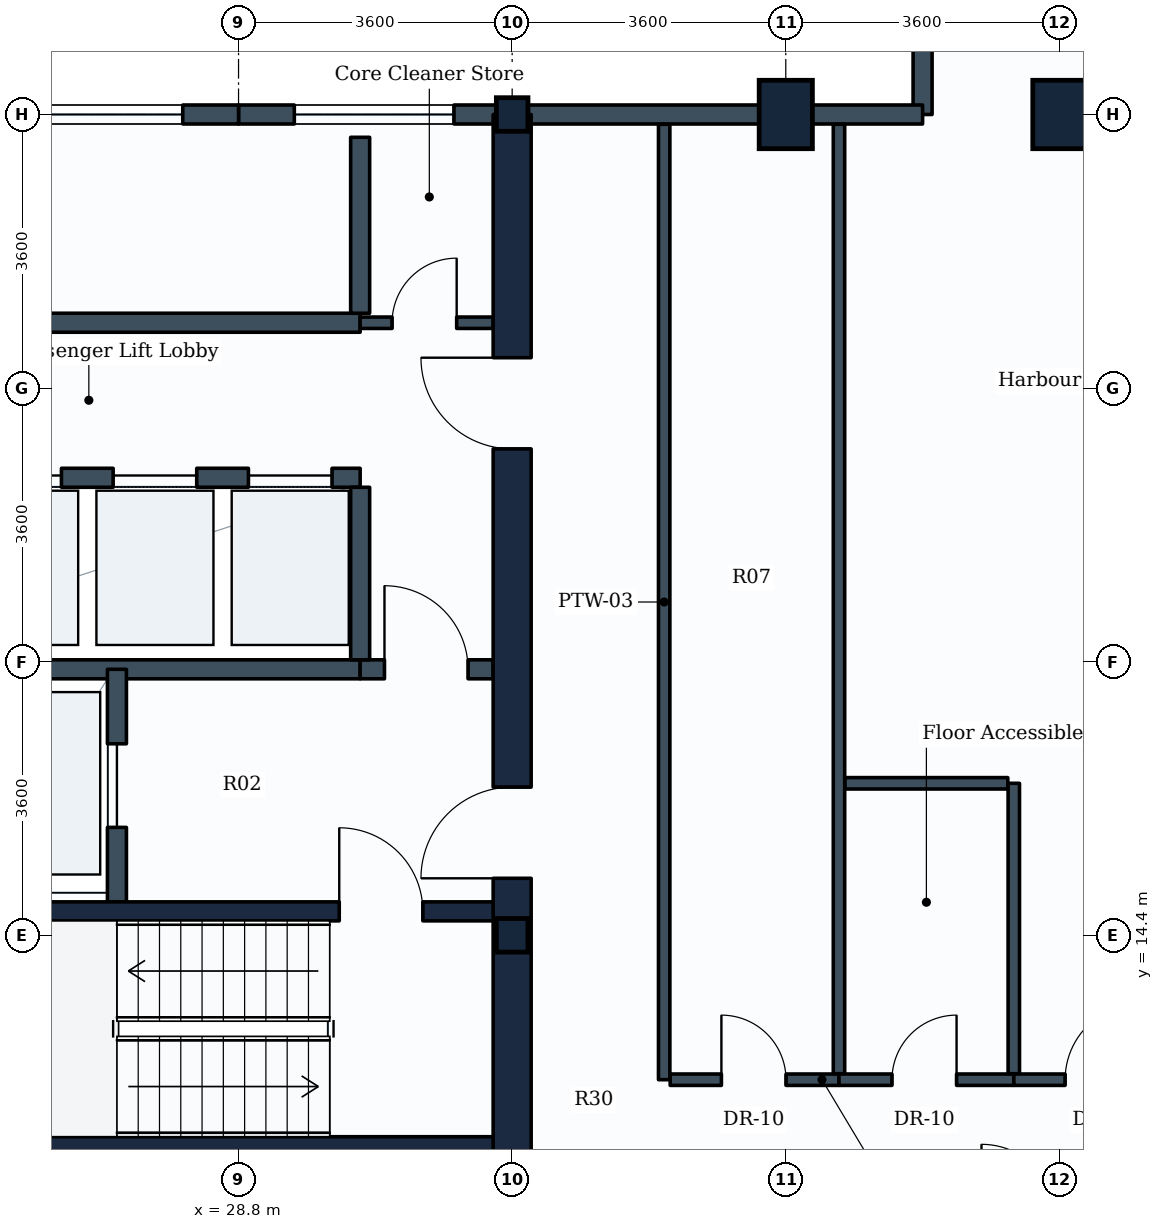
"""IFC4 building model, lengths in metres.
Left out: names, types, materials, properties, quantities, classifications, styles, units other than length and angle.
Written with IfcOpenShell. Run it as: python <this file> out.ifc"""

import sys

from ifc_helpers import new_model, si_unit, direction, frame, frame_2d, origin, origin_2d, place, context, subcontext, project, spatial, rectangle, i_section, extrude, element, fill, save


model = new_model("IFC4")
c1 = context("Model", 3, precision=1e-05, world=origin(), true_north=direction((0.0, 1.0)))
c2 = subcontext(c1, "Body", "Model", "MODEL_VIEW")
j1 = project(units=[si_unit("LENGTHUNIT", "METRE"), si_unit("PLANEANGLEUNIT", "RADIAN")], contexts=[c1])
p1 = place(None, origin())
s1 = spatial("IfcSite", under=j1, at=p1, CompositionType="ELEMENT")
p2 = place(p1, origin())
s2 = spatial("IfcBuilding", under=s1, at=p2, CompositionType="ELEMENT")
p3 = place(p2, frame((0.0, 0.0, 178.6)))
s3 = spatial("IfcBuildingStorey", under=s2, at=p3, CompositionType="ELEMENT", Elevation=178.6)
for number, where, z_axis, x_axis in (
    (1, (32.4, 14.4, 0.0), (0.0, 0.0, 1.0), (1.0, 0.0, 0.0)),
    (2, (32.4, 25.2, 0.0), (0.0, 0.0, 1.0), (1.0, 0.0, 0.0)),
):
    element("IfcColumn", number, at=place(p3, frame(where, z_axis=z_axis, x_axis=x_axis)), inside=s3, PredefinedType="COLUMN", context=c2, shape_type="SweptSolid", body=[
        extrude(i_section(OverallWidth=0.416, OverallDepth=0.442, WebThickness=0.025, FlangeThickness=0.041, FilletRadius=0.015, at=origin_2d()), origin(), (0.0, 0.0, 1.0), 3.8),
    ])
for number, where, z_axis, x_axis in (
    (3, (36.0, 25.2, 0.0), (0.0, 0.0, 1.0), (1.0, 0.0, 0.0)),
    (4, (39.6, 25.2, 0.0), (0.0, 0.0, 1.0), (1.0, 0.0, 0.0)),
):
    element("IfcColumn", number, at=place(p3, frame(where, z_axis=z_axis, x_axis=x_axis)), inside=s3, PredefinedType="COLUMN", context=c2, shape_type="SweptSolid", body=[
        extrude(rectangle(XDim=0.7, YDim=0.9, at=origin_2d()), origin(), (0.0, 0.0, 1.0), 3.8),
    ])
p4 = place(p3, frame((37.8, 27.3, 0.0), z_axis=(0.0, 0.0, 1.0), x_axis=(0.0, -1.0, 0.0)))
e5 = element("IfcWall", 5, at=p4, inside=s3, PredefinedType="STANDARD", context=c2, shape_type="SweptSolid", body=[
    extrude(rectangle(XDim=2.1, YDim=0.25, at=frame_2d((1.05, 0.0))), origin(), (0.0, 0.0, 1.0), 2.93),
])
p5 = place(p3, frame((36.0, 25.2, 0.0), z_axis=(0.0, 0.0, 1.0), x_axis=(1.0, 0.0, 0.0)))
e6 = element("IfcWall", 6, at=p5, inside=s3, PredefinedType="STANDARD", context=c2, shape_type="SweptSolid", body=[
    extrude(rectangle(XDim=1.8, YDim=0.25, at=frame_2d((0.9, 0.0))), origin(), (0.0, 0.0, 1.0), 2.93),
])
p6 = place(p3, frame((32.4, 25.2, 0.0), z_axis=(0.0, 0.0, 1.0), x_axis=(1.0, 0.0, 0.0)))
e7 = element("IfcWall", 7, at=p6, inside=s3, PredefinedType="STANDARD", context=c2, shape_type="SweptSolid", body=[
    extrude(rectangle(XDim=3.6, YDim=0.25, at=frame_2d((1.8, 0.0))), origin(), (0.0, 0.0, 1.0), 2.93),
])
p7 = place(p3, frame((28.8, 25.2, 0.0), z_axis=(0.0, 0.0, 1.0), x_axis=(1.0, 0.0, 0.0)))
e8 = element("IfcWall", 8, at=p7, inside=s3, PredefinedType="STANDARD", context=c2, shape_type="SweptSolid", body=[
    extrude(rectangle(XDim=3.6, YDim=0.25, at=frame_2d((1.8, 0.0))), origin(), (0.0, 0.0, 1.0), 2.93),
])
p8 = place(p7, frame((0.734, 0.0, 0.85)))
e9 = element("IfcOpeningElement", 9, at=p8, cuts=e8, PredefinedType="OPENING", context=c2, shape_type="SweptSolid", body=[
    extrude(rectangle(XDim=2.1, YDim=1.35, at=frame_2d((1.05, 0.675))), frame((0.0, 0.135, 0.0), z_axis=(0.0, -1.0, 0.0), x_axis=(1.0, 0.0, 0.0)), (0.0, 0.0, 1.0), 0.27),
])
p9 = place(p3, frame((25.2, 25.2, 0.0), z_axis=(0.0, 0.0, 1.0), x_axis=(1.0, 0.0, 0.0)))
e10 = element("IfcWall", 10, at=p9, inside=s3, PredefinedType="STANDARD", context=c2, shape_type="SweptSolid", body=[
    extrude(rectangle(XDim=3.6, YDim=0.25, at=frame_2d((1.8, 0.0))), origin(), (0.0, 0.0, 1.0), 2.93),
])
p10 = place(p9, frame((0.766, 0.0, 0.85)))
e11 = element("IfcOpeningElement", 11, at=p10, cuts=e10, PredefinedType="OPENING", context=c2, shape_type="SweptSolid", body=[
    extrude(rectangle(XDim=2.1, YDim=1.35, at=frame_2d((1.05, 0.675))), frame((0.0, 0.135, 0.0), z_axis=(0.0, -1.0, 0.0), x_axis=(1.0, 0.0, 0.0)), (0.0, 0.0, 1.0), 0.27),
])
p11 = place(p3, frame((32.4, 10.8, 0.0), z_axis=(0.0, 0.0, 1.0), x_axis=(0.0, 1.0, 0.0)))
e12 = element("IfcWall", 12, at=p11, inside=s3, PredefinedType="SHEAR", context=c2, shape_type="SweptSolid", body=[
    extrude(rectangle(XDim=14.4, YDim=0.5, at=frame_2d((7.2, 0.0))), origin(), (0.0, 0.0, 1.0), 3.55),
])
p12 = place(p11, frame((4.35, 0.0, 0.0)))
e13 = element("IfcOpeningElement", 13, at=p12, cuts=e12, PredefinedType="OPENING", context=c2, shape_type="SweptSolid", body=[
    extrude(rectangle(XDim=1.2, YDim=2.1, at=frame_2d((0.6, 1.05))), frame((0.0, 0.26, 0.0), z_axis=(0.0, -1.0, 0.0), x_axis=(1.0, 0.0, 0.0)), (0.0, 0.0, 1.0), 0.52),
])
p13 = place(p11, frame((10.0, 0.0, 0.0)))
e14 = element("IfcOpeningElement", 14, at=p13, cuts=e12, PredefinedType="OPENING", context=c2, shape_type="SweptSolid", body=[
    extrude(rectangle(XDim=1.2, YDim=2.1, at=frame_2d((0.6, 1.05))), frame((0.0, 0.26, 0.0), z_axis=(0.0, -1.0, 0.0), x_axis=(1.0, 0.0, 0.0)), (0.0, 0.0, 1.0), 0.52),
])
p14 = place(p3, frame((23.35, 11.625, 0.0), z_axis=(0.0, 0.0, 1.0), x_axis=(1.0, 0.0, 0.0)))
e15 = element("IfcWall", 15, at=p14, inside=s3, PredefinedType="SHEAR", context=c2, shape_type="SweptSolid", body=[
    extrude(rectangle(XDim=8.8, YDim=0.25, at=frame_2d((4.4, 0.0))), origin(), (0.0, 0.0, 1.0), 3.55),
])
p15 = place(p3, frame((23.35, 14.715, 0.0), z_axis=(0.0, 0.0, 1.0), x_axis=(1.0, 0.0, 0.0)))
e16 = element("IfcWall", 16, at=p15, inside=s3, PredefinedType="SHEAR", context=c2, shape_type="SweptSolid", body=[
    extrude(rectangle(XDim=8.8, YDim=0.25, at=frame_2d((4.4, 0.0))), origin(), (0.0, 0.0, 1.0), 3.55),
])
p16 = place(p15, frame((6.775, 0.0, 0.0)))
e17 = element("IfcOpeningElement", 17, at=p16, cuts=e16, PredefinedType="OPENING", context=c2, shape_type="SweptSolid", body=[
    extrude(rectangle(XDim=1.1, YDim=2.1, at=frame_2d((0.55, 1.05))), frame((0.0, 0.135, 0.0), z_axis=(0.0, -1.0, 0.0), x_axis=(1.0, 0.0, 0.0)), (0.0, 0.0, 1.0), 0.27),
])
p17 = place(p3, frame((21.88, 17.9, 0.0), z_axis=(0.0, 0.0, 1.0), x_axis=(1.0, 0.0, 0.0)))
e18 = element("IfcWall", 18, at=p17, inside=s3, PredefinedType="PARTITIONING", context=c2, shape_type="SweptSolid", body=[
    extrude(rectangle(XDim=8.52, YDim=0.25, at=frame_2d((4.26, 0.0))), origin(), (0.0, 0.0, 1.0), 3.535),
])
p18 = place(p3, frame((30.4, 17.9, 0.0), z_axis=(0.0, 0.0, 1.0), x_axis=(1.0, 0.0, 0.0)))
e19 = element("IfcWall", 19, at=p18, inside=s3, PredefinedType="PARTITIONING", context=c2, shape_type="SweptSolid", body=[
    extrude(rectangle(XDim=1.75, YDim=0.25, at=frame_2d((0.875, 0.0))), origin(), (0.0, 0.0, 1.0), 3.535),
])
p19 = place(p18, frame((0.32, 0.0, 0.0)))
e20 = element("IfcOpeningElement", 20, at=p19, cuts=e19, PredefinedType="OPENING", context=c2, shape_type="SweptSolid", body=[
    extrude(rectangle(XDim=1.1, YDim=2.1, at=frame_2d((0.55, 1.05))), frame((0.0, 0.135, 0.0), z_axis=(0.0, -1.0, 0.0), x_axis=(1.0, 0.0, 0.0)), (0.0, 0.0, 1.0), 0.27),
])
p20 = place(p3, frame((27.2, 14.84, 0.0), z_axis=(0.0, 0.0, 1.0), x_axis=(0.0, 1.0, 0.0)))
e21 = element("IfcWall", 21, at=p20, inside=s3, PredefinedType="PARTITIONING", context=c2, shape_type="SweptSolid", body=[
    extrude(rectangle(XDim=3.06, YDim=0.25, at=frame_2d((1.53, 0.0))), origin(), (0.0, 0.0, 1.0), 3.535),
])
p21 = place(p20, frame((0.98, 0.0, 0.0)))
e22 = element("IfcOpeningElement", 22, at=p21, cuts=e21, PredefinedType="OPENING", context=c2, shape_type="SweptSolid", body=[
    extrude(rectangle(XDim=1.1, YDim=2.1, at=frame_2d((0.55, 1.05))), frame((0.0, 0.135, 0.0), z_axis=(0.0, -1.0, 0.0), x_axis=(1.0, 0.0, 0.0)), (0.0, 0.0, 1.0), 0.27),
])
p22 = place(p3, frame((23.18, 20.42, 0.0), z_axis=(0.0, 0.0, 1.0), x_axis=(1.0, 0.0, 0.0)))
e23 = element("IfcWall", 23, at=p22, inside=s3, PredefinedType="PARTITIONING", context=c2, shape_type="SweptSolid", body=[
    extrude(rectangle(XDim=7.22, YDim=0.25, at=frame_2d((3.61, 0.0))), origin(), (0.0, 0.0, 1.0), 3.535),
])
p23 = place(p22, frame((0.41, 0.0, 0.0)))
e24 = element("IfcOpeningElement", 24, at=p23, cuts=e23, PredefinedType="OPENING", context=c2, shape_type="SweptSolid", body=[
    extrude(rectangle(XDim=1.1, YDim=2.1, at=frame_2d((0.55, 1.05))), frame((0.0, 0.135, 0.0), z_axis=(0.0, -1.0, 0.0), x_axis=(1.0, 0.0, 0.0)), (0.0, 0.0, 1.0), 0.27),
])
p24 = place(p22, frame((2.19, 0.0, 0.0)))
e25 = element("IfcOpeningElement", 25, at=p24, cuts=e23, PredefinedType="OPENING", context=c2, shape_type="SweptSolid", body=[
    extrude(rectangle(XDim=1.1, YDim=2.1, at=frame_2d((0.55, 1.05))), frame((0.0, 0.135, 0.0), z_axis=(0.0, -1.0, 0.0), x_axis=(1.0, 0.0, 0.0)), (0.0, 0.0, 1.0), 0.27),
])
p25 = place(p22, frame((3.97, 0.0, 0.0)))
e26 = element("IfcOpeningElement", 26, at=p25, cuts=e23, PredefinedType="OPENING", context=c2, shape_type="SweptSolid", body=[
    extrude(rectangle(XDim=1.1, YDim=2.1, at=frame_2d((0.55, 1.05))), frame((0.0, 0.135, 0.0), z_axis=(0.0, -1.0, 0.0), x_axis=(1.0, 0.0, 0.0)), (0.0, 0.0, 1.0), 0.27),
])
p26 = place(p22, frame((5.75, 0.0, 0.0)))
e27 = element("IfcOpeningElement", 27, at=p26, cuts=e23, PredefinedType="OPENING", context=c2, shape_type="SweptSolid", body=[
    extrude(rectangle(XDim=1.1, YDim=2.1, at=frame_2d((0.55, 1.05))), frame((0.0, 0.135, 0.0), z_axis=(0.0, -1.0, 0.0), x_axis=(1.0, 0.0, 0.0)), (0.0, 0.0, 1.0), 0.27),
])
p27 = place(p3, frame((30.4, 18.025, 0.0), z_axis=(0.0, 0.0, 1.0), x_axis=(0.0, 1.0, 0.0)))
e28 = element("IfcWall", 28, at=p27, inside=s3, PredefinedType="PARTITIONING", context=c2, shape_type="SweptSolid", body=[
    extrude(rectangle(XDim=2.27, YDim=0.25, at=frame_2d((1.135, 0.0))), origin(), (0.0, 0.0, 1.0), 3.535),
])
p28 = place(p3, frame((23.18, 22.46, 0.0), z_axis=(0.0, 0.0, 1.0), x_axis=(1.0, 0.0, 0.0)))
e29 = element("IfcWall", 29, at=p28, inside=s3, PredefinedType="PARTITIONING", context=c2, shape_type="SweptSolid", body=[
    extrude(rectangle(XDim=7.22, YDim=0.25, at=frame_2d((3.61, 0.0))), origin(), (0.0, 0.0, 1.0), 3.535),
])
p29 = place(p3, frame((30.4, 22.585, 0.0), z_axis=(0.0, 0.0, 1.0), x_axis=(0.0, 1.0, 0.0)))
e30 = element("IfcWall", 30, at=p29, inside=s3, PredefinedType="PARTITIONING", context=c2, shape_type="SweptSolid", body=[
    extrude(rectangle(XDim=2.315, YDim=0.25, at=frame_2d((1.157, 0.0))), origin(), (0.0, 0.0, 1.0), 3.535),
])
p30 = place(p3, frame((30.4, 22.46, 0.0), z_axis=(0.0, 0.0, 1.0), x_axis=(1.0, 0.0, 0.0)))
e31 = element("IfcWall", 31, at=p30, inside=s3, PredefinedType="PARTITIONING", context=c2, shape_type="SweptSolid", body=[
    extrude(rectangle(XDim=1.75, YDim=0.15, at=frame_2d((0.875, 0.0))), origin(), (0.0, 0.0, 1.0), 3.535),
])
p31 = place(p30, frame((0.42, 0.0, 0.0)))
e32 = element("IfcOpeningElement", 32, at=p31, cuts=e31, PredefinedType="OPENING", context=c2, shape_type="SweptSolid", body=[
    extrude(rectangle(XDim=0.85, YDim=2.1, at=frame_2d((0.425, 1.05))), frame((0.0, 0.085, 0.0), z_axis=(0.0, -1.0, 0.0), x_axis=(1.0, 0.0, 0.0)), (0.0, 0.0, 1.0), 0.17),
])
p32 = place(p3, frame((34.4, 12.5, 0.0), z_axis=(0.0, 0.0, 1.0), x_axis=(0.0, 1.0, 0.0)))
e33 = element("IfcWall", 33, at=p32, inside=s3, PredefinedType="PARTITIONING", context=c2, shape_type="SweptSolid", body=[
    extrude(rectangle(XDim=12.571, YDim=0.15, at=frame_2d((6.286, 0.0))), origin(), (0.0, 0.0, 1.0), 2.93),
])
p33 = place(p3, frame((34.479, 12.5, 0.0), z_axis=(0.0, 0.0, 1.0), x_axis=(1.0, 0.0, 0.0)))
e34 = element("IfcWall", 34, at=p33, inside=s3, PredefinedType="PARTITIONING", context=c2, shape_type="SweptSolid", body=[
    extrude(rectangle(XDim=2.221, YDim=0.15, at=frame_2d((1.11, 0.0))), origin(), (0.0, 0.0, 1.0), 3.22),
])
p34 = place(p33, frame((0.674, 0.0, 0.0)))
e35 = element("IfcOpeningElement", 35, at=p34, cuts=e34, PredefinedType="OPENING", context=c2, shape_type="SweptSolid", body=[
    extrude(rectangle(XDim=0.85, YDim=2.1, at=frame_2d((0.425, 1.05))), frame((0.0, 0.085, 0.0), z_axis=(0.0, -1.0, 0.0), x_axis=(1.0, 0.0, 0.0)), (0.0, 0.0, 1.0), 0.17),
])
p35 = place(p3, frame((36.7, 12.579, 0.0), z_axis=(0.0, 0.0, 1.0), x_axis=(0.0, 1.0, 0.0)))
e36 = element("IfcWall", 36, at=p35, inside=s3, PredefinedType="PARTITIONING", context=c2, shape_type="SweptSolid", body=[
    extrude(rectangle(XDim=12.492, YDim=0.15, at=frame_2d((6.246, 0.0))), origin(), (0.0, 0.0, 1.0), 2.93),
])
p36 = place(p3, frame((36.7, 12.5, 0.0), z_axis=(0.0, 0.0, 1.0), x_axis=(1.0, 0.0, 0.0)))
e37 = element("IfcWall", 37, at=p36, inside=s3, PredefinedType="PARTITIONING", context=c2, shape_type="SweptSolid", body=[
    extrude(rectangle(XDim=2.3, YDim=0.15, at=frame_2d((1.15, 0.0))), origin(), (0.0, 0.0, 1.0), 3.535),
])
p37 = place(p36, frame((0.697, 0.0, 0.0)))
e38 = element("IfcOpeningElement", 38, at=p37, cuts=e37, PredefinedType="OPENING", context=c2, shape_type="SweptSolid", body=[
    extrude(rectangle(XDim=0.85, YDim=2.1, at=frame_2d((0.425, 1.05))), frame((0.0, 0.085, 0.0), z_axis=(0.0, -1.0, 0.0), x_axis=(1.0, 0.0, 0.0)), (0.0, 0.0, 1.0), 0.17),
])
p38 = place(p3, frame((39.0, 12.579, 0.0), z_axis=(0.0, 0.0, 1.0), x_axis=(0.0, 1.0, 0.0)))
e39 = element("IfcWall", 39, at=p38, inside=s3, PredefinedType="PARTITIONING", context=c2, shape_type="SweptSolid", body=[
    extrude(rectangle(XDim=3.821, YDim=0.15, at=frame_2d((1.91, 0.0))), origin(), (0.0, 0.0, 1.0), 3.17),
])
p39 = place(p3, frame((36.779, 16.4, 0.0), z_axis=(0.0, 0.0, 1.0), x_axis=(1.0, 0.0, 0.0)))
e40 = element("IfcWall", 40, at=p39, inside=s3, PredefinedType="PARTITIONING", context=c2, shape_type="SweptSolid", body=[
    extrude(rectangle(XDim=2.142, YDim=0.15, at=frame_2d((1.071, 0.0))), origin(), (0.0, 0.0, 1.0), 3.535),
])
p40 = place(p3, frame((39.0, 12.5, 0.0), z_axis=(0.0, 0.0, 1.0), x_axis=(1.0, 0.0, 0.0)))
e41 = element("IfcWall", 41, at=p40, inside=s3, PredefinedType="PARTITIONING", context=c2, shape_type="SweptSolid", body=[
    extrude(rectangle(XDim=5.946, YDim=0.15, at=frame_2d((2.973, 0.0))), origin(), (0.0, 0.0, 1.0), 3.17),
])
p41 = place(p40, frame((0.675, 0.0, 0.0)))
e42 = element("IfcOpeningElement", 42, at=p41, cuts=e41, PredefinedType="OPENING", context=c2, shape_type="SweptSolid", body=[
    extrude(rectangle(XDim=1.0, YDim=2.1, at=frame_2d((0.5, 1.05))), frame((0.0, 0.085, 0.0), z_axis=(0.0, -1.0, 0.0), x_axis=(1.0, 0.0, 0.0)), (0.0, 0.0, 1.0), 0.17),
])
p42 = place(p8, origin())
e43 = element("IfcWindow", 43, at=p42, inside=s3, PartitioningType="SINGLE_PANEL", PredefinedType="WINDOW", context=c2, shape_type="SweptSolid", body=[
    extrude(rectangle(XDim=2.1, YDim=1.35, at=frame_2d((1.05, 0.675))), frame((0.0, 0.03, 0.0), z_axis=(0.0, -1.0, 0.0), x_axis=(1.0, 0.0, 0.0)), (0.0, 0.0, 1.0), 0.06),
])
fill(e9, e43)
p43 = place(p10, origin())
e44 = element("IfcWindow", 44, at=p43, inside=s3, PartitioningType="SINGLE_PANEL", PredefinedType="WINDOW", context=c2, shape_type="SweptSolid", body=[
    extrude(rectangle(XDim=2.1, YDim=1.35, at=frame_2d((1.05, 0.675))), frame((0.0, 0.03, 0.0), z_axis=(0.0, -1.0, 0.0), x_axis=(1.0, 0.0, 0.0)), (0.0, 0.0, 1.0), 0.06),
])
fill(e11, e44)
p44 = place(p16, origin())
e45 = element("IfcDoor", 45, at=p44, inside=s3, OperationType="SINGLE_SWING_LEFT", PredefinedType="DOOR", context=c2, shape_type="SweptSolid", body=[
    extrude(rectangle(XDim=1.1, YDim=2.1, at=frame_2d((0.55, 1.05))), frame((0.0, 0.025, 0.0), z_axis=(0.0, -1.0, 0.0), x_axis=(1.0, 0.0, 0.0)), (0.0, 0.0, 1.0), 0.05),
])
fill(e17, e45)
p45 = place(p21, origin())
e46 = element("IfcDoor", 46, at=p45, inside=s3, OperationType="SLIDING_TO_LEFT", PredefinedType="DOOR", context=c2, shape_type="SweptSolid", body=[
    extrude(rectangle(XDim=1.1, YDim=2.1, at=frame_2d((0.55, 1.05))), frame((0.0, 0.025, 0.0), z_axis=(0.0, -1.0, 0.0), x_axis=(1.0, 0.0, 0.0)), (0.0, 0.0, 1.0), 0.05),
])
fill(e22, e46)
p46 = place(p12, origin())
e47 = element("IfcDoor", 47, at=p46, inside=s3, OperationType="SINGLE_SWING_LEFT", PredefinedType="DOOR", context=c2, shape_type="SweptSolid", body=[
    extrude(rectangle(XDim=1.2, YDim=2.1, at=frame_2d((0.6, 1.05))), frame((0.0, 0.025, 0.0), z_axis=(0.0, -1.0, 0.0), x_axis=(1.0, 0.0, 0.0)), (0.0, 0.0, 1.0), 0.05),
])
fill(e13, e47)
p47 = place(p19, origin())
e48 = element("IfcDoor", 48, at=p47, inside=s3, OperationType="SINGLE_SWING_LEFT", PredefinedType="DOOR", context=c2, shape_type="SweptSolid", body=[
    extrude(rectangle(XDim=1.1, YDim=2.1, at=frame_2d((0.55, 1.05))), frame((0.0, 0.025, 0.0), z_axis=(0.0, -1.0, 0.0), x_axis=(1.0, 0.0, 0.0)), (0.0, 0.0, 1.0), 0.05),
])
fill(e20, e48)
p48 = place(p24, origin())
e49 = element("IfcDoor", 49, at=p48, inside=s3, OperationType="SLIDING_TO_LEFT", PredefinedType="DOOR", context=c2, shape_type="SweptSolid", body=[
    extrude(rectangle(XDim=1.1, YDim=2.1, at=frame_2d((0.55, 1.05))), frame((0.0, 0.025, 0.0), z_axis=(0.0, -1.0, 0.0), x_axis=(1.0, 0.0, 0.0)), (0.0, 0.0, 1.0), 0.05),
])
fill(e25, e49)
p49 = place(p25, origin())
e50 = element("IfcDoor", 50, at=p49, inside=s3, OperationType="SLIDING_TO_LEFT", PredefinedType="DOOR", context=c2, shape_type="SweptSolid", body=[
    extrude(rectangle(XDim=1.1, YDim=2.1, at=frame_2d((0.55, 1.05))), frame((0.0, 0.025, 0.0), z_axis=(0.0, -1.0, 0.0), x_axis=(1.0, 0.0, 0.0)), (0.0, 0.0, 1.0), 0.05),
])
fill(e26, e50)
p50 = place(p26, origin())
e51 = element("IfcDoor", 51, at=p50, inside=s3, OperationType="SLIDING_TO_LEFT", PredefinedType="DOOR", context=c2, shape_type="SweptSolid", body=[
    extrude(rectangle(XDim=1.1, YDim=2.1, at=frame_2d((0.55, 1.05))), frame((0.0, 0.025, 0.0), z_axis=(0.0, -1.0, 0.0), x_axis=(1.0, 0.0, 0.0)), (0.0, 0.0, 1.0), 0.05),
])
fill(e27, e51)
p51 = place(p13, origin())
e52 = element("IfcDoor", 52, at=p51, inside=s3, OperationType="SINGLE_SWING_RIGHT", PredefinedType="DOOR", context=c2, shape_type="SweptSolid", body=[
    extrude(rectangle(XDim=1.2, YDim=2.1, at=frame_2d((0.6, 1.05))), frame((0.0, 0.025, 0.0), z_axis=(0.0, -1.0, 0.0), x_axis=(1.0, 0.0, 0.0)), (0.0, 0.0, 1.0), 0.05),
])
fill(e14, e52)
p52 = place(p31, origin())
e53 = element("IfcDoor", 53, at=p52, inside=s3, OperationType="SINGLE_SWING_RIGHT", PredefinedType="DOOR", context=c2, shape_type="SweptSolid", body=[
    extrude(rectangle(XDim=0.85, YDim=2.1, at=frame_2d((0.425, 1.05))), frame((0.0, 0.025, 0.0), z_axis=(0.0, -1.0, 0.0), x_axis=(1.0, 0.0, 0.0)), (0.0, 0.0, 1.0), 0.05),
])
fill(e32, e53)
p53 = place(p34, origin())
e54 = element("IfcDoor", 54, at=p53, inside=s3, OperationType="SINGLE_SWING_LEFT", PredefinedType="DOOR", context=c2, shape_type="SweptSolid", body=[
    extrude(rectangle(XDim=0.85, YDim=2.1, at=frame_2d((0.425, 1.05))), frame((0.0, 0.025, 0.0), z_axis=(0.0, -1.0, 0.0), x_axis=(1.0, 0.0, 0.0)), (0.0, 0.0, 1.0), 0.05),
])
fill(e35, e54)
p54 = place(p37, origin())
e55 = element("IfcDoor", 55, at=p54, inside=s3, OperationType="SINGLE_SWING_RIGHT", PredefinedType="DOOR", context=c2, shape_type="SweptSolid", body=[
    extrude(rectangle(XDim=0.85, YDim=2.1, at=frame_2d((0.425, 1.05))), frame((0.0, 0.025, 0.0), z_axis=(0.0, -1.0, 0.0), x_axis=(1.0, 0.0, 0.0)), (0.0, 0.0, 1.0), 0.05),
])
fill(e38, e55)
p55 = place(p41, origin())
e56 = element("IfcDoor", 56, at=p55, inside=s3, OperationType="SINGLE_SWING_RIGHT", PredefinedType="DOOR", context=c2, shape_type="SweptSolid", body=[
    extrude(rectangle(XDim=1.0, YDim=2.1, at=frame_2d((0.5, 1.05))), frame((0.0, 0.025, 0.0), z_axis=(0.0, -1.0, 0.0), x_axis=(1.0, 0.0, 0.0)), (0.0, 0.0, 1.0), 0.05),
])
fill(e42, e56)
save(model, sys.argv[1])
